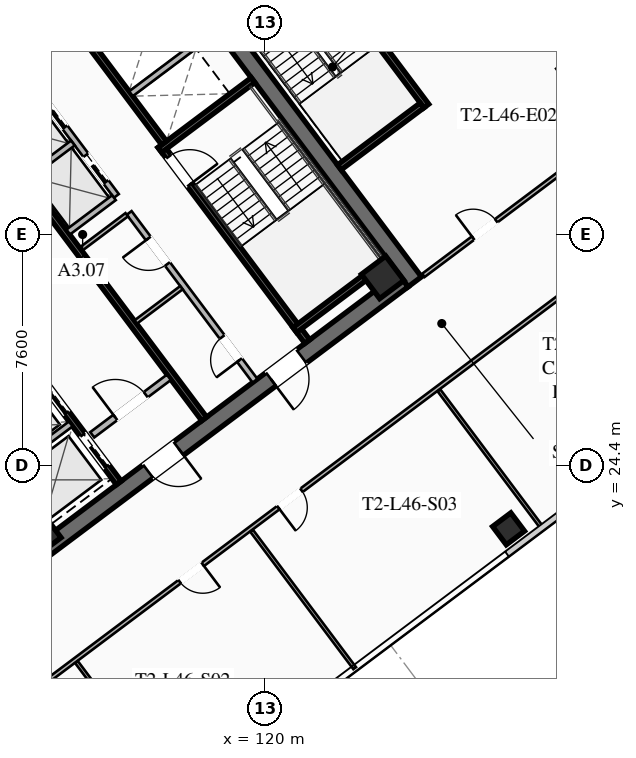
"""IFC4 building model, lengths in metres.
Left out: names, types, materials, properties, quantities, classifications, styles, units other than length and angle.
Written with IfcOpenShell. Run it as: python <this file> out.ifc"""

import sys

from ifc_helpers import new_model, si_unit, direction, frame, frame_2d, origin, origin_2d, place, context, subcontext, project, spatial, rectangle, hollow_rectangle, extrude, element, fill, save


model = new_model("IFC4")
c1 = context("Model", 3, precision=1e-05, world=origin(), true_north=direction((0.0, 1.0)))
c2 = subcontext(c1, "Body", "Model", "MODEL_VIEW")
j1 = project(units=[si_unit("LENGTHUNIT", "METRE"), si_unit("PLANEANGLEUNIT", "RADIAN")], contexts=[c1])
p1 = place(None, origin())
s1 = spatial("IfcSite", under=j1, at=p1, CompositionType="ELEMENT")
p2 = place(p1, origin())
s2 = spatial("IfcBuilding", under=s1, at=p2, CompositionType="ELEMENT")
p3 = place(p2, frame((0.0, 0.0, 171.2)))
s3 = spatial("IfcBuildingStorey", under=s2, at=p3, CompositionType="ELEMENT", Elevation=171.2)
p4 = place(p3, frame((115.564, 42.923, 0.0), z_axis=(0.0, 0.0, 1.0), x_axis=(0.600005007985, -0.799996243986, 0.0)))
e1 = element("IfcWall", 1, at=p4, inside=s3, PredefinedType="SHEAR", context=c2, shape_type="SweptSolid", body=[
    extrude(rectangle(XDim=15.6, YDim=0.55, at=frame_2d((7.8, 0.0))), origin(), (0.0, 0.0, 1.0), 3.55),
])
p5 = place(p3, frame((124.539, 30.498, 0.0), z_axis=(0.0, 0.0, 1.0), x_axis=(-0.799998054672, -0.600002593761, 0.0)))
e2 = element("IfcWall", 2, at=p5, inside=s3, PredefinedType="SHEAR", context=c2, shape_type="SweptSolid", body=[
    extrude(rectangle(XDim=15.06, YDim=0.55, at=frame_2d((7.53, 0.0))), origin(), (0.0, 0.0, 1.0), 3.55),
])
p6 = place(p5, frame((9.23, 0.0, 0.0)))
e3 = element("IfcOpeningElement", 3, at=p6, cuts=e2, PredefinedType="OPENING", context=c2, shape_type="SweptSolid", body=[
    extrude(rectangle(XDim=1.25, YDim=2.25, at=frame_2d((0.625, 1.125))), frame((0.0, 0.285, 0.0), z_axis=(0.0, -1.0, 0.0), x_axis=(1.0, 0.0, 0.0)), (0.0, 0.0, 1.0), 0.57),
])
p7 = place(p5, frame((4.18, 0.0, 0.0)))
e4 = element("IfcOpeningElement", 4, at=p7, cuts=e2, PredefinedType="OPENING", context=c2, shape_type="SweptSolid", body=[
    extrude(rectangle(XDim=1.25, YDim=2.25, at=frame_2d((0.625, 1.125))), frame((0.0, 0.285, 0.0), z_axis=(0.0, -1.0, 0.0), x_axis=(1.0, 0.0, 0.0)), (0.0, 0.0, 1.0), 0.57),
])
p8 = place(p3, frame((103.461, 33.502, 0.0), z_axis=(0.0, 0.0, 1.0), x_axis=(0.799998054672, 0.600002593761, 0.0)))
e5 = element("IfcWall", 5, at=p8, inside=s3, PredefinedType="SHEAR", context=c2, shape_type="SweptSolid", body=[
    extrude(rectangle(XDim=15.06, YDim=0.55, at=frame_2d((7.53, 0.0))), origin(), (0.0, 0.0, 1.0), 3.55),
])
p9 = place(p8, frame((4.58, 0.0, 0.0)))
e6 = element("IfcOpeningElement", 6, at=p9, cuts=e5, PredefinedType="OPENING", context=c2, shape_type="SweptSolid", body=[
    extrude(rectangle(XDim=1.25, YDim=2.25, at=frame_2d((0.625, 1.125))), frame((0.0, 0.285, 0.0), z_axis=(0.0, -1.0, 0.0), x_axis=(1.0, 0.0, 0.0)), (0.0, 0.0, 1.0), 0.57),
])
p10 = place(p8, frame((9.63, 0.0, 0.0)))
e7 = element("IfcOpeningElement", 7, at=p10, cuts=e5, PredefinedType="OPENING", context=c2, shape_type="SweptSolid", body=[
    extrude(rectangle(XDim=1.25, YDim=2.25, at=frame_2d((0.625, 1.125))), frame((0.0, 0.285, 0.0), z_axis=(0.0, -1.0, 0.0), x_axis=(1.0, 0.0, 0.0)), (0.0, 0.0, 1.0), 0.57),
])
for number, where, z_axis, x_axis in (
    (8, (112.59, 22.13, 0.0), (0.0, 0.0, 1.0), (0.8, 0.6, 0.0)),
    (9, (123.87, 30.59, 0.0), (0.0, 0.0, 1.0), (0.8, 0.6, 0.0)),
):
    element("IfcColumn", number, at=place(p3, frame(where, z_axis=z_axis, x_axis=x_axis)), inside=s3, PredefinedType="COLUMN", context=c2, shape_type="SweptSolid", body=[
        extrude(hollow_rectangle(XDim=1.0, YDim=1.0, WallThickness=0.04, at=origin_2d()), origin(), (0.0, 0.0, 1.0), 3.37),
    ])
p11 = place(p3, frame((128.01, 22.32, 0.0), z_axis=(0.0, 0.0, 1.0), x_axis=(0.799999996291, 0.600000004945, 0.0)))
e10 = element("IfcColumn", 10, at=p11, inside=s3, PredefinedType="COLUMN", context=c2, shape_type="SweptSolid", body=[
    extrude(hollow_rectangle(XDim=0.75, YDim=0.75, WallThickness=0.032, at=origin_2d()), origin(), (0.0, 0.0, 1.0), 3.37),
])
p12 = place(p3, frame((116.56, 34.92, 0.0), z_axis=(0.0, 0.0, 1.0), x_axis=(0.59999029481, -0.8000072788, 0.0)))
e11 = element("IfcWall", 11, at=p12, inside=s3, PredefinedType="SHEAR", context=c2, shape_type="SweptSolid", body=[
    extrude(rectangle(XDim=8.05, YDim=0.2, at=frame_2d((4.025, 0.0))), origin(), (0.0, 0.0, 1.0), 3.37),
])
p13 = place(p12, frame((0.45, 0.0, 0.0)))
e12 = element("IfcOpeningElement", 12, at=p13, cuts=e11, PredefinedType="OPENING", context=c2, shape_type="SweptSolid", body=[
    extrude(rectangle(XDim=1.15, YDim=2.2, at=frame_2d((0.575, 1.1))), frame((0.0, 0.11, 0.0), z_axis=(0.0, -1.0, 0.0), x_axis=(1.0, 0.0, 0.0)), (0.0, 0.0, 1.0), 0.22),
])
for number, where, z_axis, x_axis in (
    (13, (116.54, 34.78, 0.0), (0.0, 0.0, 1.0), (0.8, 0.6, 0.0)),
    (14, (120.98, 28.86, 0.0), (0.0, 0.0, 1.0), (0.8, 0.6, 0.0)),
):
    element("IfcWall", number, at=place(p3, frame(where, z_axis=z_axis, x_axis=x_axis)), inside=s3, PredefinedType="SHEAR", context=c2, shape_type="SweptSolid", body=[
        extrude(rectangle(XDim=3.83, YDim=0.2, at=frame_2d((1.915, 0.0))), origin(), (0.0, 0.0, 1.0), 3.37),
    ])
p14 = place(p3, frame((117.998, 25.936, 0.0), z_axis=(0.0, 0.0, 1.0), x_axis=(-0.600002693989, 0.799997979501, 0.0)))
e15 = element("IfcWall", 15, at=p14, inside=s3, PredefinedType="SHEAR", context=c2, shape_type="SweptSolid", body=[
    extrude(rectangle(XDim=14.5, YDim=0.2, at=frame_2d((7.25, 0.0))), origin(), (0.0, 0.0, 1.0), 3.37),
])
p15 = place(p3, frame((114.316, 25.412, 0.0), z_axis=(0.0, 0.0, 1.0), x_axis=(0.800018601094, 0.59997519774, 0.0)))
e16 = element("IfcWall", 16, at=p15, inside=s3, PredefinedType="SOLIDWALL", context=c2, shape_type="SweptSolid", body=[
    extrude(rectangle(XDim=3.15, YDim=0.22, at=frame_2d((1.575, 0.0))), origin(), (0.0, 0.0, 1.0), 2.723),
])
p16 = place(p15, frame((0.95, 0.0, 0.0)))
e17 = element("IfcOpeningElement", 17, at=p16, cuts=e16, PredefinedType="OPENING", context=c2, shape_type="SweptSolid", body=[
    extrude(rectangle(XDim=1.25, YDim=2.25, at=frame_2d((0.625, 1.125))), frame((0.0, 0.12, 0.0), z_axis=(0.0, -1.0, 0.0), x_axis=(1.0, 0.0, 0.0)), (0.0, 0.0, 1.0), 0.24),
])
p17 = place(p3, frame((115.19, 23.83, 0.0), z_axis=(0.0, 0.0, 1.0), x_axis=(-0.599993943644, 0.800004542231, 0.0)))
e18 = element("IfcWall", 18, at=p17, inside=s3, PredefinedType="SHEAR", context=c2, shape_type="SweptSolid", body=[
    extrude(rectangle(XDim=6.45, YDim=0.2, at=frame_2d((3.225, 0.0))), origin(), (0.0, 0.0, 1.0), 3.37),
])
p18 = place(p17, frame((4.875, 0.0, 0.0)))
e19 = element("IfcOpeningElement", 19, at=p18, cuts=e18, PredefinedType="OPENING", context=c2, shape_type="SweptSolid", body=[
    extrude(rectangle(XDim=1.3, YDim=2.25, at=frame_2d((0.65, 1.125))), frame((0.0, 0.11, 0.0), z_axis=(0.0, -1.0, 0.0), x_axis=(1.0, 0.0, 0.0)), (0.0, 0.0, 1.0), 0.22),
])
p19 = place(p17, frame((2.875, 0.0, 0.0)))
e20 = element("IfcOpeningElement", 20, at=p19, cuts=e18, PredefinedType="OPENING", context=c2, shape_type="SweptSolid", body=[
    extrude(rectangle(XDim=1.3, YDim=2.25, at=frame_2d((0.65, 1.125))), frame((0.0, 0.11, 0.0), z_axis=(0.0, -1.0, 0.0), x_axis=(1.0, 0.0, 0.0)), (0.0, 0.0, 1.0), 0.22),
])
p20 = place(p17, frame((0.675, 0.0, 0.0)))
e21 = element("IfcOpeningElement", 21, at=p20, cuts=e18, PredefinedType="OPENING", context=c2, shape_type="SweptSolid", body=[
    extrude(rectangle(XDim=1.3, YDim=2.25, at=frame_2d((0.65, 1.125))), frame((0.0, 0.11, 0.0), z_axis=(0.0, -1.0, 0.0), x_axis=(1.0, 0.0, 0.0)), (0.0, 0.0, 1.0), 0.22),
])
p21 = place(p3, frame((110.826, 23.682, 0.0), z_axis=(0.0, 0.0, 1.0), x_axis=(0.8, 0.6, 0.0)))
e22 = element("IfcWall", 22, at=p21, inside=s3, PredefinedType="SOLIDWALL", context=c2, shape_type="SweptSolid", body=[
    extrude(rectangle(XDim=3.48, YDim=0.2, at=frame_2d((1.74, 0.0))), origin(), (0.0, 0.0, 1.0), 3.37),
])
p22 = place(p3, frame((112.81, 40.17, 0.0), z_axis=(0.0, 0.0, 1.0), x_axis=(0.599993943644, -0.800004542231, 0.0)))
e23 = element("IfcWall", 23, at=p22, inside=s3, PredefinedType="SHEAR", context=c2, shape_type="SweptSolid", body=[
    extrude(rectangle(XDim=6.45, YDim=0.2, at=frame_2d((3.225, 0.0))), origin(), (0.0, 0.0, 1.0), 3.37),
])
p23 = place(p3, frame((115.59, 36.63, 0.0), z_axis=(0.0, 0.0, 1.0), x_axis=(0.799974743577, 0.600033673754, 0.0)))
e24 = element("IfcWall", 24, at=p23, inside=s3, PredefinedType="SOLIDWALL", context=c2, shape_type="SweptSolid", body=[
    extrude(rectangle(XDim=3.48, YDim=0.2, at=frame_2d((1.74, 0.0))), origin(), (0.0, 0.0, 1.0), 3.37),
])
p24 = place(p3, frame((119.67, 27.19, 0.0), z_axis=(0.0, 0.0, 1.0), x_axis=(-0.599988677396, 0.800008491828, 0.0)))
e25 = element("IfcWall", 25, at=p24, inside=s3, PredefinedType="SOLIDWALL", context=c2, shape_type="SweptSolid", body=[
    extrude(rectangle(XDim=6.9, YDim=0.2, at=frame_2d((3.45, 0.0))), origin(), (0.0, 0.0, 1.0), 2.723),
])
p25 = place(p24, frame((0.85, 0.0, 0.0)))
e26 = element("IfcOpeningElement", 26, at=p25, cuts=e25, PredefinedType="OPENING", context=c2, shape_type="SweptSolid", body=[
    extrude(rectangle(XDim=0.95, YDim=2.05, at=frame_2d((0.475, 1.025))), frame((0.0, 0.11, 0.0), z_axis=(0.0, -1.0, 0.0), x_axis=(1.0, 0.0, 0.0)), (0.0, 0.0, 1.0), 0.22),
])
p26 = place(p24, frame((4.8, 0.0, 0.0)))
e27 = element("IfcOpeningElement", 27, at=p26, cuts=e25, PredefinedType="OPENING", context=c2, shape_type="SweptSolid", body=[
    extrude(rectangle(XDim=1.05, YDim=2.2, at=frame_2d((0.525, 1.1))), frame((0.0, 0.11, 0.0), z_axis=(0.0, -1.0, 0.0), x_axis=(1.0, 0.0, 0.0)), (0.0, 0.0, 1.0), 0.22),
])
for number, where, z_axis, x_axis in (
    (28, (113.946, 31.522, 0.0), (0.0, 0.0, 1.0), (0.8, 0.6, 0.0)),
    (29, (115.746, 29.122, 0.0), (0.0, 0.0, 1.0), (0.8, 0.6, 0.0)),
):
    element("IfcWall", number, at=place(p3, frame(where, z_axis=z_axis, x_axis=x_axis)), inside=s3, PredefinedType="PARTITIONING", context=c2, shape_type="SweptSolid", body=[
        extrude(rectangle(XDim=1.88, YDim=0.135, at=frame_2d((0.94, 0.0))), origin(), (0.0, 0.0, 1.0), 2.723),
    ])
p27 = place(p3, frame((115.11, 33.27, 0.0), z_axis=(0.0, 0.0, 1.0), x_axis=(-0.600011322243, 0.799991508192, 0.0)))
e30 = element("IfcWall", 30, at=p27, inside=s3, PredefinedType="SOLIDWALL", context=c2, shape_type="SweptSolid", body=[
    extrude(rectangle(XDim=6.9, YDim=0.2, at=frame_2d((3.45, 0.0))), origin(), (0.0, 0.0, 1.0), 3.37),
])
p28 = place(p27, frame((0.575, 0.0, 0.0)))
e31 = element("IfcOpeningElement", 31, at=p28, cuts=e30, PredefinedType="OPENING", context=c2, shape_type="SweptSolid", body=[
    extrude(rectangle(XDim=1.1, YDim=2.2, at=frame_2d((0.55, 1.1))), frame((0.0, 0.11, 0.0), z_axis=(0.0, -1.0, 0.0), x_axis=(1.0, 0.0, 0.0)), (0.0, 0.0, 1.0), 0.22),
])
p29 = place(p27, frame((2.825, 0.0, 0.0)))
e32 = element("IfcOpeningElement", 32, at=p29, cuts=e30, PredefinedType="OPENING", context=c2, shape_type="SweptSolid", body=[
    extrude(rectangle(XDim=1.1, YDim=2.2, at=frame_2d((0.55, 1.1))), frame((0.0, 0.11, 0.0), z_axis=(0.0, -1.0, 0.0), x_axis=(1.0, 0.0, 0.0)), (0.0, 0.0, 1.0), 0.22),
])
p30 = place(p27, frame((5.075, 0.0, 0.0)))
e33 = element("IfcOpeningElement", 33, at=p30, cuts=e30, PredefinedType="OPENING", context=c2, shape_type="SweptSolid", body=[
    extrude(rectangle(XDim=1.1, YDim=2.2, at=frame_2d((0.55, 1.1))), frame((0.0, 0.11, 0.0), z_axis=(0.0, -1.0, 0.0), x_axis=(1.0, 0.0, 0.0)), (0.0, 0.0, 1.0), 0.22),
])
p31 = place(p3, frame((113.526, 32.082, 0.0), z_axis=(0.0, 0.0, 1.0), x_axis=(0.800046745961, 0.599937666993, 0.0)))
e34 = element("IfcWall", 34, at=p31, inside=s3, PredefinedType="SOLIDWALL", context=c2, shape_type="SweptSolid", body=[
    extrude(rectangle(XDim=1.88, YDim=0.2, at=frame_2d((0.94, 0.0))), origin(), (0.0, 0.0, 1.0), 3.37),
])
p32 = place(p3, frame((112.176, 33.882, 0.0), z_axis=(0.0, 0.0, 1.0), x_axis=(0.8, 0.6, 0.0)))
e35 = element("IfcWall", 35, at=p32, inside=s3, PredefinedType="SOLIDWALL", context=c2, shape_type="SweptSolid", body=[
    extrude(rectangle(XDim=1.88, YDim=0.2, at=frame_2d((0.94, 0.0))), origin(), (0.0, 0.0, 1.0), 3.37),
])
p33 = place(p3, frame((125.304, 36.228, 0.0), z_axis=(0.0, 0.0, 1.0), x_axis=(-0.59998851072, 0.800008616831, 0.0)))
e36 = element("IfcWall", 36, at=p33, inside=s3, PredefinedType="SHEAR", context=c2, shape_type="SweptSolid", body=[
    extrude(rectangle(XDim=6.8, YDim=0.2, at=frame_2d((3.4, 0.0))), origin(), (0.0, 0.0, 1.0), 3.37),
])
p34 = place(p3, frame((122.444, 34.208, 0.0), z_axis=(0.0, 0.0, 1.0), x_axis=(0.79999138319, 0.600011488909, 0.0)))
e37 = element("IfcWall", 37, at=p34, inside=s3, PredefinedType="SHEAR", context=c2, shape_type="SweptSolid", body=[
    extrude(rectangle(XDim=3.4, YDim=0.2, at=frame_2d((1.7, 0.0))), origin(), (0.0, 0.0, 1.0), 3.37),
])
p35 = place(p3, frame((96.058, 32.006, 0.0), z_axis=(0.0, 0.0, 1.0), x_axis=(0.8, 0.6, 0.0)))
e38 = element("IfcWall", 38, at=p35, inside=s3, PredefinedType="PARTITIONING", context=c2, shape_type="SweptSolid", body=[
    extrude(rectangle(XDim=28.7, YDim=0.135, at=frame_2d((14.35, 0.0))), origin(), (0.0, 0.0, 1.0), 2.723),
])
p36 = place(p35, frame((0.3, 0.0, 0.0)))
e39 = element("IfcOpeningElement", 39, at=p36, cuts=e38, PredefinedType="OPENING", context=c2, shape_type="SweptSolid", body=[
    extrude(rectangle(XDim=0.95, YDim=2.05, at=frame_2d((0.475, 1.025))), frame((0.0, 0.077, 0.0), z_axis=(0.0, -1.0, 0.0), x_axis=(1.0, 0.0, 0.0)), (0.0, 0.0, 1.0), 0.155),
])
p37 = place(p35, frame((10.01, 0.0, 0.0)))
e40 = element("IfcOpeningElement", 40, at=p37, cuts=e38, PredefinedType="OPENING", context=c2, shape_type="SweptSolid", body=[
    extrude(rectangle(XDim=0.95, YDim=2.05, at=frame_2d((0.475, 1.025))), frame((0.0, 0.077, 0.0), z_axis=(0.0, -1.0, 0.0), x_axis=(1.0, 0.0, 0.0)), (0.0, 0.0, 1.0), 0.155),
])
p38 = place(p35, frame((14.033, 0.0, 0.0)))
e41 = element("IfcOpeningElement", 41, at=p38, cuts=e38, PredefinedType="OPENING", context=c2, shape_type="SweptSolid", body=[
    extrude(rectangle(XDim=0.95, YDim=2.05, at=frame_2d((0.475, 1.025))), frame((0.0, 0.077, 0.0), z_axis=(0.0, -1.0, 0.0), x_axis=(1.0, 0.0, 0.0)), (0.0, 0.0, 1.0), 0.155),
])
p39 = place(p35, frame((27.45, 0.0, 0.0)))
e42 = element("IfcOpeningElement", 42, at=p39, cuts=e38, PredefinedType="OPENING", context=c2, shape_type="SweptSolid", body=[
    extrude(rectangle(XDim=0.95, YDim=2.05, at=frame_2d((0.475, 1.025))), frame((0.0, 0.077, 0.0), z_axis=(0.0, -1.0, 0.0), x_axis=(1.0, 0.0, 0.0)), (0.0, 0.0, 1.0), 0.155),
])
p40 = place(p3, frame((132.11, 31.77, 0.0), z_axis=(0.0, 0.0, 1.0), x_axis=(-0.800003062365, -0.599995916825, 0.0)))
e43 = element("IfcWall", 43, at=p40, inside=s3, PredefinedType="PARTITIONING", context=c2, shape_type="SweptSolid", body=[
    extrude(rectangle(XDim=28.7, YDim=0.135, at=frame_2d((14.35, 0.0))), origin(), (0.0, 0.0, 1.0), 2.723),
])
p41 = place(p40, frame((27.37, 0.0, 0.0)))
e44 = element("IfcOpeningElement", 44, at=p41, cuts=e43, PredefinedType="OPENING", context=c2, shape_type="SweptSolid", body=[
    extrude(rectangle(XDim=0.95, YDim=2.05, at=frame_2d((0.475, 1.025))), frame((0.0, 0.077, 0.0), z_axis=(0.0, -1.0, 0.0), x_axis=(1.0, 0.0, 0.0)), (0.0, 0.0, 1.0), 0.155),
])
p42 = place(p40, frame((17.698, 0.0, 0.0)))
e45 = element("IfcOpeningElement", 45, at=p42, cuts=e43, PredefinedType="OPENING", context=c2, shape_type="SweptSolid", body=[
    extrude(rectangle(XDim=0.95, YDim=2.05, at=frame_2d((0.475, 1.025))), frame((0.0, 0.077, 0.0), z_axis=(0.0, -1.0, 0.0), x_axis=(1.0, 0.0, 0.0)), (0.0, 0.0, 1.0), 0.155),
])
p43 = place(p40, frame((13.639, 0.0, 0.0)))
e46 = element("IfcOpeningElement", 46, at=p43, cuts=e43, PredefinedType="OPENING", context=c2, shape_type="SweptSolid", body=[
    extrude(rectangle(XDim=0.95, YDim=2.05, at=frame_2d((0.475, 1.025))), frame((0.0, 0.077, 0.0), z_axis=(0.0, -1.0, 0.0), x_axis=(1.0, 0.0, 0.0)), (0.0, 0.0, 1.0), 0.155),
])
p44 = place(p40, frame((0.38, 0.0, 0.0)))
e47 = element("IfcOpeningElement", 47, at=p44, cuts=e43, PredefinedType="OPENING", context=c2, shape_type="SweptSolid", body=[
    extrude(rectangle(XDim=0.95, YDim=2.05, at=frame_2d((0.475, 1.025))), frame((0.0, 0.077, 0.0), z_axis=(0.0, -1.0, 0.0), x_axis=(1.0, 0.0, 0.0)), (0.0, 0.0, 1.0), 0.155),
])
for number, where, z_axis, x_axis in (
    (48, (117.188, 13.416, 0.0), (0.0, 0.0, 1.0), (-0.6, 0.8, 0.0)),
    (49, (122.948, 17.736, 0.0), (0.0, 0.0, 1.0), (-0.6, 0.8, 0.0)),
    (50, (129.108, 22.356, 0.0), (0.0, 0.0, 1.0), (-0.6, 0.8, 0.0)),
):
    element("IfcWall", number, at=place(p3, frame(where, z_axis=z_axis, x_axis=x_axis)), inside=s3, PredefinedType="PARTITIONING", context=c2, shape_type="SweptSolid", body=[
        extrude(rectangle(XDim=5.65, YDim=0.11, at=frame_2d((2.825, 0.0))), origin(), (0.0, 0.0, 1.0), 2.723),
    ])
p45 = place(p3, frame((125.208, 30.656, 0.0), z_axis=(0.0, 0.0, 1.0), x_axis=(0.800006797429, 0.599990936654, 0.0)))
e51 = element("IfcWall", 51, at=p45, inside=s3, PredefinedType="PARTITIONING", context=c2, shape_type="SweptSolid", body=[
    extrude(rectangle(XDim=8.62, YDim=0.135, at=frame_2d((4.31, 0.0))), origin(), (0.0, 0.0, 1.0), 2.723),
])
p46 = place(p45, frame((2.045, 0.0, 0.0)))
e52 = element("IfcOpeningElement", 52, at=p46, cuts=e51, PredefinedType="OPENING", context=c2, shape_type="SweptSolid", body=[
    extrude(rectangle(XDim=0.95, YDim=2.05, at=frame_2d((0.475, 1.025))), frame((0.0, 0.077, 0.0), z_axis=(0.0, -1.0, 0.0), x_axis=(1.0, 0.0, 0.0)), (0.0, 0.0, 1.0), 0.155),
])
p47 = place(p6, origin())
e53 = element("IfcDoor", 53, at=p47, inside=s3, OperationType="SINGLE_SWING_LEFT", PredefinedType="DOOR", context=c2, shape_type="SweptSolid", body=[
    extrude(rectangle(XDim=1.25, YDim=2.25, at=frame_2d((0.625, 1.125))), frame((0.0, 0.025, 0.0), z_axis=(0.0, -1.0, 0.0), x_axis=(1.0, 0.0, 0.0)), (0.0, 0.0, 1.0), 0.05),
])
fill(e3, e53)
p48 = place(p7, origin())
e54 = element("IfcDoor", 54, at=p48, inside=s3, OperationType="SINGLE_SWING_RIGHT", PredefinedType="DOOR", context=c2, shape_type="SweptSolid", body=[
    extrude(rectangle(XDim=1.25, YDim=2.25, at=frame_2d((0.625, 1.125))), frame((0.0, 0.025, 0.0), z_axis=(0.0, -1.0, 0.0), x_axis=(1.0, 0.0, 0.0)), (0.0, 0.0, 1.0), 0.05),
])
fill(e4, e54)
p49 = place(p13, origin())
e55 = element("IfcDoor", 55, at=p49, inside=s3, OperationType="SINGLE_SWING_RIGHT", PredefinedType="DOOR", context=c2, shape_type="SweptSolid", body=[
    extrude(rectangle(XDim=1.15, YDim=2.2, at=frame_2d((0.575, 1.1))), frame((0.0, 0.025, 0.0), z_axis=(0.0, -1.0, 0.0), x_axis=(1.0, 0.0, 0.0)), (0.0, 0.0, 1.0), 0.05),
])
fill(e12, e55)
p50 = place(p16, origin())
e56 = element("IfcDoor", 56, at=p50, inside=s3, OperationType="SINGLE_SWING_LEFT", PredefinedType="DOOR", context=c2, shape_type="SweptSolid", body=[
    extrude(rectangle(XDim=1.25, YDim=2.25, at=frame_2d((0.625, 1.125))), frame((0.0, 0.025, 0.0), z_axis=(0.0, -1.0, 0.0), x_axis=(1.0, 0.0, 0.0)), (0.0, 0.0, 1.0), 0.05),
])
fill(e17, e56)
p51 = place(p25, origin())
e57 = element("IfcDoor", 57, at=p51, inside=s3, OperationType="SINGLE_SWING_LEFT", PredefinedType="DOOR", context=c2, shape_type="SweptSolid", body=[
    extrude(rectangle(XDim=0.95, YDim=2.05, at=frame_2d((0.475, 1.025))), frame((0.0, 0.025, 0.0), z_axis=(0.0, -1.0, 0.0), x_axis=(1.0, 0.0, 0.0)), (0.0, 0.0, 1.0), 0.05),
])
fill(e26, e57)
p52 = place(p26, origin())
e58 = element("IfcDoor", 58, at=p52, inside=s3, OperationType="SINGLE_SWING_RIGHT", PredefinedType="DOOR", context=c2, shape_type="SweptSolid", body=[
    extrude(rectangle(XDim=1.05, YDim=2.2, at=frame_2d((0.525, 1.1))), frame((0.0, 0.025, 0.0), z_axis=(0.0, -1.0, 0.0), x_axis=(1.0, 0.0, 0.0)), (0.0, 0.0, 1.0), 0.05),
])
fill(e27, e58)
p53 = place(p42, origin())
e59 = element("IfcDoor", 59, at=p53, inside=s3, OperationType="SINGLE_SWING_LEFT", PredefinedType="DOOR", context=c2, shape_type="SweptSolid", body=[
    extrude(rectangle(XDim=0.95, YDim=2.05, at=frame_2d((0.475, 1.025))), frame((0.0, 0.025, 0.0), z_axis=(0.0, -1.0, 0.0), x_axis=(1.0, 0.0, 0.0)), (0.0, 0.0, 1.0), 0.05),
])
fill(e45, e59)
p54 = place(p43, origin())
e60 = element("IfcDoor", 60, at=p54, inside=s3, OperationType="SINGLE_SWING_RIGHT", PredefinedType="DOOR", context=c2, shape_type="SweptSolid", body=[
    extrude(rectangle(XDim=0.95, YDim=2.05, at=frame_2d((0.475, 1.025))), frame((0.0, 0.025, 0.0), z_axis=(0.0, -1.0, 0.0), x_axis=(1.0, 0.0, 0.0)), (0.0, 0.0, 1.0), 0.05),
])
fill(e46, e60)
p55 = place(p46, origin())
e61 = element("IfcDoor", 61, at=p55, inside=s3, OperationType="SINGLE_SWING_LEFT", PredefinedType="DOOR", context=c2, shape_type="SweptSolid", body=[
    extrude(rectangle(XDim=0.95, YDim=2.05, at=frame_2d((0.475, 1.025))), frame((0.0, 0.025, 0.0), z_axis=(0.0, -1.0, 0.0), x_axis=(1.0, 0.0, 0.0)), (0.0, 0.0, 1.0), 0.05),
])
fill(e52, e61)
p56 = place(p19, origin())
e62 = element("IfcDoor", 62, at=p56, inside=s3, OperationType="SLIDING_TO_LEFT", PredefinedType="DOOR", context=c2, shape_type="SweptSolid", body=[
    extrude(rectangle(XDim=1.3, YDim=2.25, at=frame_2d((0.65, 1.125))), frame((0.0, 0.025, 0.0), z_axis=(0.0, -1.0, 0.0), x_axis=(1.0, 0.0, 0.0)), (0.0, 0.0, 1.0), 0.05),
])
fill(e20, e62)
p57 = place(p20, origin())
e63 = element("IfcDoor", 63, at=p57, inside=s3, OperationType="SLIDING_TO_LEFT", PredefinedType="DOOR", context=c2, shape_type="SweptSolid", body=[
    extrude(rectangle(XDim=1.3, YDim=2.25, at=frame_2d((0.65, 1.125))), frame((0.0, 0.025, 0.0), z_axis=(0.0, -1.0, 0.0), x_axis=(1.0, 0.0, 0.0)), (0.0, 0.0, 1.0), 0.05),
])
fill(e21, e63)
p58 = place(p28, origin())
e64 = element("IfcDoor", 64, at=p58, inside=s3, OperationType="SLIDING_TO_LEFT", PredefinedType="DOOR", context=c2, shape_type="SweptSolid", body=[
    extrude(rectangle(XDim=1.1, YDim=2.2, at=frame_2d((0.55, 1.1))), frame((0.0, 0.025, 0.0), z_axis=(0.0, -1.0, 0.0), x_axis=(1.0, 0.0, 0.0)), (0.0, 0.0, 1.0), 0.05),
])
fill(e31, e64)
p59 = place(p29, origin())
e65 = element("IfcDoor", 65, at=p59, inside=s3, OperationType="SLIDING_TO_LEFT", PredefinedType="DOOR", context=c2, shape_type="SweptSolid", body=[
    extrude(rectangle(XDim=1.1, YDim=2.2, at=frame_2d((0.55, 1.1))), frame((0.0, 0.025, 0.0), z_axis=(0.0, -1.0, 0.0), x_axis=(1.0, 0.0, 0.0)), (0.0, 0.0, 1.0), 0.05),
])
fill(e32, e65)
save(model, sys.argv[1])
